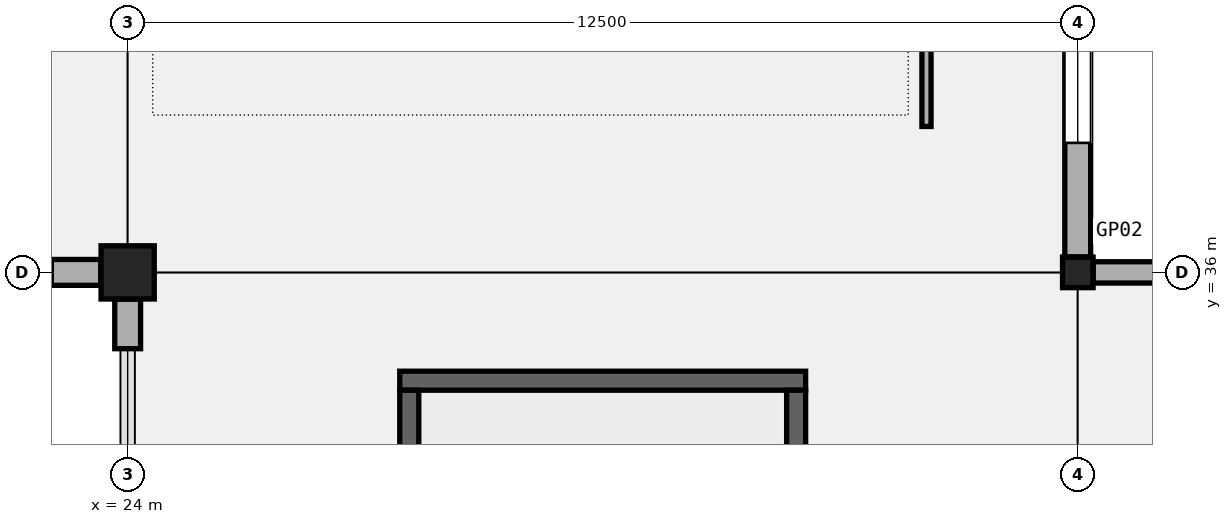
"""IFC4 building model, lengths in metres.
Left out: names, types, materials, properties, quantities, classifications, styles, units other than length and angle.
Written with IfcOpenShell. Run it as: python <this file> out.ifc"""

import sys

from ifc_helpers import new_model, si_unit, direction, frame, frame_2d, origin, origin_2d, place, context, subcontext, project, spatial, rectangle, hollow_rectangle, extrude, element, fill, save


model = new_model("IFC4")
c1 = context("Model", 3, precision=1e-05, world=origin(), true_north=direction((0.0, 1.0)))
c2 = subcontext(c1, "Body", "Model", "MODEL_VIEW")
j1 = project(units=[si_unit("LENGTHUNIT", "METRE"), si_unit("PLANEANGLEUNIT", "RADIAN")], contexts=[c1])
p1 = place(None, origin())
s1 = spatial("IfcSite", under=j1, at=p1, CompositionType="ELEMENT")
p2 = place(p1, origin())
s2 = spatial("IfcBuilding", under=s1, at=p2, CompositionType="ELEMENT")
p3 = place(p2, frame((0.0, 0.0, 15.3)))
s3 = spatial("IfcBuildingStorey", under=s2, at=p3, CompositionType="ELEMENT", Elevation=15.3)
p4 = place(p3, frame((24.0, 36.0, 0.0), z_axis=(0.0, 0.0, 1.0), x_axis=(1.0, 0.0, 0.0)))
e1 = element("IfcColumn", 1, at=p4, inside=s3, PredefinedType="COLUMN", context=c2, shape_type="SweptSolid", body=[
    extrude(rectangle(XDim=0.7, YDim=0.7, at=origin_2d()), origin(), (0.0, 0.0, 1.0), 5.1),
])
p5 = place(p3, frame((36.5, 36.0, 0.0), z_axis=(0.0, 0.0, 1.0), x_axis=(1.0, 0.0, 0.0)))
e2 = element("IfcColumn", 2, at=p5, inside=s3, PredefinedType="COLUMN", context=c2, shape_type="SweptSolid", body=[
    extrude(hollow_rectangle(XDim=0.4, YDim=0.4, WallThickness=0.016, InnerFilletRadius=0.016, OuterFilletRadius=0.032, at=origin_2d()), origin(), (0.0, 0.0, 1.0), 5.1),
])
for number, where, z_axis, x_axis in (
    (3, (22.996, 36.0, 0.0), (0.0, 0.0, 1.0), (1.0, 0.0, 0.0)),
    (4, (24.0, 34.996, 0.0), (0.0, 0.0, 1.0), (0.0, 1.0, 0.0)),
):
    element("IfcWall", number, at=place(p3, frame(where, z_axis=z_axis, x_axis=x_axis)), inside=s3, PredefinedType="SOLIDWALL", context=c2, shape_type="SweptSolid", body=[
        extrude(rectangle(XDim=0.65, YDim=0.34, at=frame_2d((0.325, 0.0))), origin(), (0.0, 0.0, 1.0), 4.16),
    ])
p6 = place(p3, frame((36.5, 36.204, 0.0), z_axis=(0.0, 0.0, 1.0), x_axis=(0.0, 1.0, 0.0)))
e5 = element("IfcWall", 5, at=p6, inside=s3, PredefinedType="SOLIDWALL", context=c2, shape_type="SweptSolid", body=[
    extrude(rectangle(XDim=11.617, YDim=0.34, at=frame_2d((5.809, 0.0))), origin(), (0.0, 0.0, 1.0), 4.06),
])
p7 = place(p6, frame((1.5, 0.0, 0.95)))
e6 = element("IfcOpeningElement", 6, at=p7, cuts=e5, PredefinedType="OPENING", context=c2, shape_type="SweptSolid", body=[
    extrude(rectangle(XDim=2.4, YDim=2.05, at=frame_2d((1.2, 1.025))), frame((0.0, 0.18, 0.0), z_axis=(0.0, -1.0, 0.0), x_axis=(1.0, 0.0, 0.0)), (0.0, 0.0, 1.0), 0.36),
])
p8 = place(p3, frame((36.704, 36.0, 0.0), z_axis=(0.0, 0.0, 1.0), x_axis=(1.0, 0.0, 0.0)))
e7 = element("IfcWall", 7, at=p8, inside=s3, PredefinedType="SOLIDWALL", context=c2, shape_type="SweptSolid", body=[
    extrude(rectangle(XDim=12.117, YDim=0.28, at=frame_2d((6.059, 0.0))), origin(), (0.0, 0.0, 1.0), 4.06),
])
p9 = place(p8, frame((1.5, 0.0, 0.95)))
e8 = element("IfcOpeningElement", 8, at=p9, cuts=e7, PredefinedType="OPENING", context=c2, shape_type="SweptSolid", body=[
    extrude(rectangle(XDim=3.0, YDim=2.15, at=frame_2d((1.5, 1.075))), frame((0.0, 0.15, 0.0), z_axis=(0.0, -1.0, 0.0), x_axis=(1.0, 0.0, 0.0)), (0.0, 0.0, 1.0), 0.3),
])
p10 = place(p3, frame((27.58, 34.575, 0.0), z_axis=(0.0, 0.0, 1.0), x_axis=(1.0, 0.0, 0.0)))
e9 = element("IfcWall", 9, at=p10, inside=s3, PredefinedType="SHEAR", context=c2, shape_type="SweptSolid", body=[
    extrude(rectangle(XDim=5.34, YDim=0.25, at=frame_2d((2.67, 0.0))), origin(), (0.0, 0.0, 1.0), 4.86),
])
for number, where, z_axis, x_axis in (
    (10, (27.705, 25.55, 0.0), (0.0, 0.0, 1.0), (0.0, 1.0, 0.0)),
    (11, (32.795, 25.55, 0.0), (0.0, 0.0, 1.0), (0.0, 1.0, 0.0)),
):
    element("IfcWall", number, at=place(p3, frame(where, z_axis=z_axis, x_axis=x_axis)), inside=s3, PredefinedType="SHEAR", context=c2, shape_type="SweptSolid", body=[
        extrude(rectangle(XDim=8.9, YDim=0.25, at=frame_2d((4.45, 0.0))), origin(), (0.0, 0.0, 1.0), 4.86),
    ])
p11 = place(p3, frame((34.51, 37.92, 0.0), z_axis=(0.0, 0.0, 1.0), x_axis=(0.0, 1.0, 0.0)))
e12 = element("IfcWall", 12, at=p11, inside=s3, PredefinedType="PARTITIONING", context=c2, shape_type="SweptSolid", body=[
    extrude(rectangle(XDim=9.92, YDim=0.12, at=frame_2d((4.96, 0.0))), origin(), (0.0, 0.0, 1.0), 4.22),
])
p12 = place(p11, frame((4.135, 0.0, 0.0)))
e13 = element("IfcOpeningElement", 13, at=p12, cuts=e12, PredefinedType="OPENING", context=c2, shape_type="SweptSolid", body=[
    extrude(rectangle(XDim=1.65, YDim=2.28, at=frame_2d((0.825, 1.14))), frame((0.0, 0.07, 0.0), z_axis=(0.0, -1.0, 0.0), x_axis=(1.0, 0.0, 0.0)), (0.0, 0.0, 1.0), 0.14),
])
p13 = place(p7, origin())
e14 = element("IfcWindow", 14, at=p13, inside=s3, PartitioningType="SINGLE_PANEL", PredefinedType="WINDOW", context=c2, shape_type="SweptSolid", body=[
    extrude(rectangle(XDim=2.4, YDim=2.05, at=frame_2d((1.2, 1.025))), frame((0.0, 0.03, 0.0), z_axis=(0.0, -1.0, 0.0), x_axis=(1.0, 0.0, 0.0)), (0.0, 0.0, 1.0), 0.06),
])
fill(e6, e14)
save(model, sys.argv[1])
